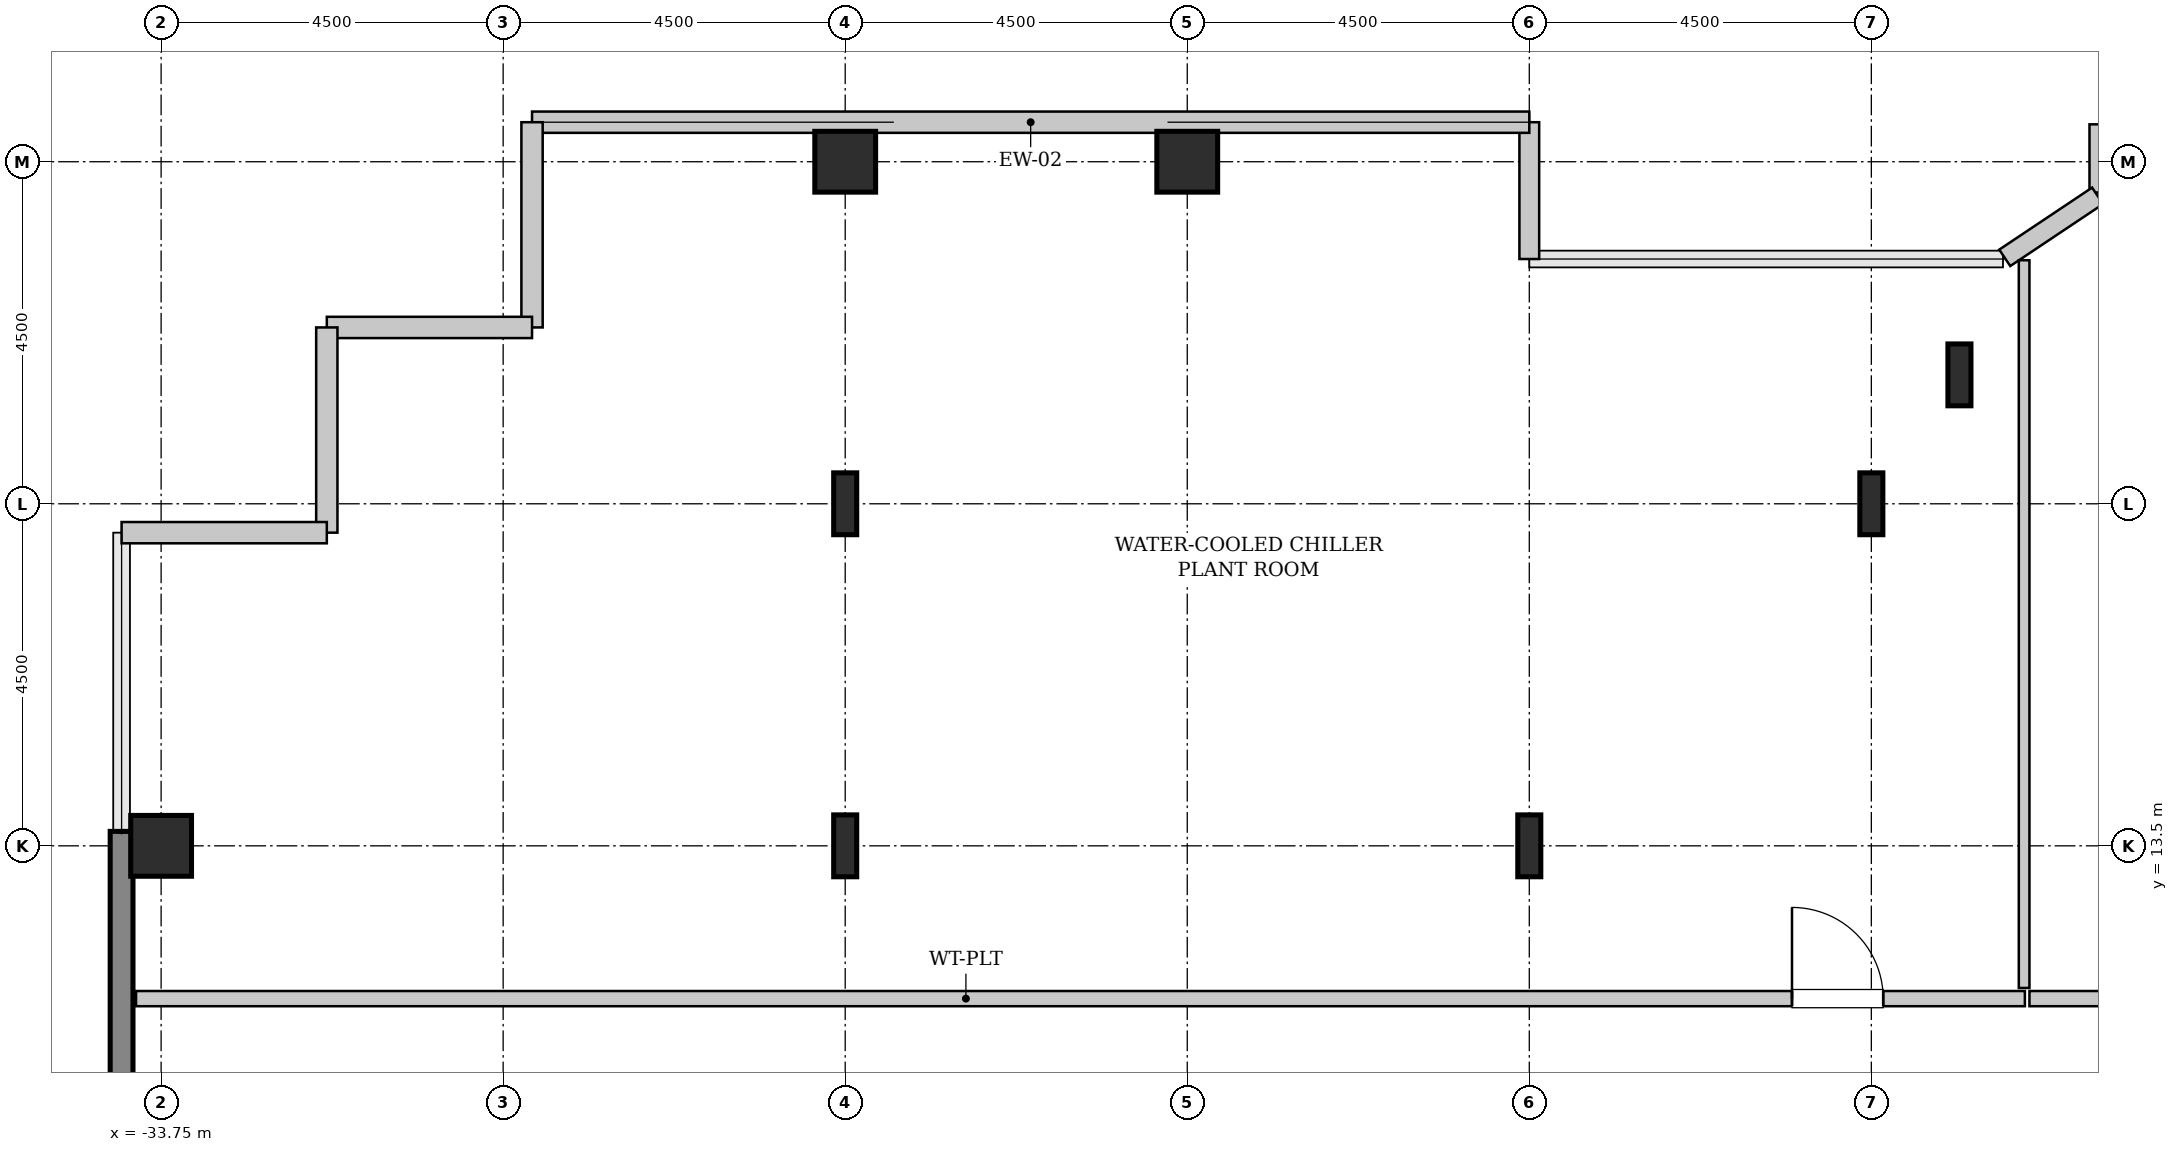
"""IFC4 building model, lengths in metres.
Left out: names, types, materials, properties, quantities, classifications, styles, units other than length and angle.
Written with IfcOpenShell. Run it as: python <this file> out.ifc"""

import sys

from ifc_helpers import new_model, si_unit, direction, frame, frame_2d, origin, origin_2d, place, context, subcontext, project, spatial, rectangle, hollow_rectangle, i_section, extrude, source, transform, mapped, element, fill, save


model = new_model("IFC4")
c1 = context("Model", 3, precision=1e-05, world=origin(), true_north=direction((0.0, 1.0)))
c2 = subcontext(c1, "Body", "Model", "MODEL_VIEW")
j1 = project(units=[si_unit("LENGTHUNIT", "METRE"), si_unit("PLANEANGLEUNIT", "RADIAN")], contexts=[c1])
p1 = place(None, origin())
s1 = spatial("IfcSite", under=j1, at=p1, CompositionType="ELEMENT")
p2 = place(p1, origin())
s2 = spatial("IfcBuilding", under=s1, at=p2, CompositionType="ELEMENT")
p3 = place(p2, frame((0.0, 0.0, 202.0)))
s3 = spatial("IfcBuildingStorey", under=s2, at=p3, CompositionType="ELEMENT", Elevation=202.0)
m1 = source(origin(), c2, "Body", "SweptSolid", [
    extrude(hollow_rectangle(XDim=0.8, YDim=0.8, WallThickness=0.04, InnerFilletRadius=0.04, OuterFilletRadius=0.08, at=origin_2d()), origin(), (0.0, 0.0, 1.0), 4.6),
])
p4 = place(p3, frame((-33.75, 13.5, 0.0), z_axis=(0.0, 0.0, 1.0), x_axis=(1.0, 0.0, 0.0)))
e1 = element("IfcColumn", 1, at=p4, inside=s3, PredefinedType="COLUMN", context=c2, shape_type="MappedRepresentation", body=[
    mapped(m1, transform((0.0, 0.0, 0.0), x_axis=(1.0, 0.0, 0.0), y_axis=(0.0, 1.0, 0.0), z_axis=(0.0, 0.0, 1.0), scale=1.0)),
])
m2 = source(origin(), c2, "Body", "SweptSolid", [
    extrude(i_section(OverallWidth=0.303, OverallDepth=0.814, WebThickness=0.021, FlangeThickness=0.04, FilletRadius=0.03, at=origin_2d()), origin(), (0.0, 0.0, 1.0), 4.6),
])
for number, where, z_axis, x_axis in (
    (2, (-24.75, 13.5, 0.0), (0.0, 0.0, 1.0), (1.0, 0.0, 0.0)),
    (3, (-24.75, 18.0, 0.0), (0.0, 0.0, 1.0), (1.0, 0.0, 0.0)),
):
    element("IfcColumn", number, at=place(p3, frame(where, z_axis=z_axis, x_axis=x_axis)), inside=s3, PredefinedType="COLUMN", context=c2, shape_type="MappedRepresentation", body=[
        mapped(m2, transform((0.0, 0.0, 0.0), x_axis=(1.0, 0.0, 0.0), y_axis=(0.0, 1.0, 0.0), z_axis=(0.0, 0.0, 1.0), scale=1.0)),
    ])
for number, where, z_axis, x_axis in (
    (4, (-24.75, 22.5, 0.0), (0.0, 0.0, 1.0), (1.0, 0.0, 0.0)),
    (5, (-20.25, 22.5, 0.0), (0.0, 0.0, 1.0), (1.0, 0.0, 0.0)),
):
    element("IfcColumn", number, at=place(p3, frame(where, z_axis=z_axis, x_axis=x_axis)), inside=s3, PredefinedType="COLUMN", context=c2, shape_type="MappedRepresentation", body=[
        mapped(m1, transform((0.0, 0.0, 0.0), x_axis=(1.0, 0.0, 0.0), y_axis=(0.0, 1.0, 0.0), z_axis=(0.0, 0.0, 1.0), scale=1.0)),
    ])
for number, where, z_axis, x_axis in (
    (6, (-15.75, 13.5, 0.0), (0.0, 0.0, 1.0), (1.0, 0.0, 0.0)),
    (7, (-11.25, 18.0, 0.0), (0.0, 0.0, 1.0), (1.0, 0.0, 0.0)),
    (8, (-10.091, 19.696, 0.0), (0.0, 0.0, 1.0), (1.0, 0.0, 0.0)),
):
    element("IfcColumn", number, at=place(p3, frame(where, z_axis=z_axis, x_axis=x_axis)), inside=s3, PredefinedType="COLUMN", context=c2, shape_type="MappedRepresentation", body=[
        mapped(m2, transform((0.0, 0.0, 0.0), x_axis=(1.0, 0.0, 0.0), y_axis=(0.0, 1.0, 0.0), z_axis=(0.0, 0.0, 1.0), scale=1.0)),
    ])
m3 = source(origin(), c2, "Body", "SweptSolid", [
    extrude(rectangle(XDim=9.38, YDim=0.3, at=frame_2d((4.69, 0.0))), origin(), (0.0, 0.0, 1.0), 4.35),
])
p5 = place(p3, frame((-34.27, 4.31, 0.0), z_axis=(0.0, 0.0, 1.0), x_axis=(0.0, 1.0, 0.0)))
e9 = element("IfcWall", 9, at=p5, inside=s3, PredefinedType="SHEAR", context=c2, shape_type="MappedRepresentation", body=[
    mapped(m3, transform((0.0, 0.0, 0.0), x_axis=(1.0, 0.0, 0.0), y_axis=(0.0, 1.0, 0.0), z_axis=(0.0, 0.0, 1.0), scale=1.0)),
])
m4 = source(origin(), c2, "Body", "SweptSolid", [
    extrude(rectangle(XDim=0.897, YDim=0.26, at=frame_2d((0.448, 0.0))), origin(), (0.0, 0.0, 1.0), 4.35),
])
p6 = place(p3, frame((-8.25, 22.992, 0.0), z_axis=(0.0, 0.0, 1.0), x_axis=(0.0, -1.0, 0.0)))
e10 = element("IfcWall", 10, at=p6, inside=s3, PredefinedType="SOLIDWALL", context=c2, shape_type="MappedRepresentation", body=[
    mapped(m4, transform((0.0, 0.0, 0.0), x_axis=(1.0, 0.0, 0.0), y_axis=(0.0, 1.0, 0.0), z_axis=(0.0, 0.0, 1.0), scale=1.0)),
])
m5 = source(origin(), c2, "Body", "SweptSolid", [
    extrude(rectangle(XDim=1.469, YDim=0.26, at=frame_2d((0.734, 0.0))), origin(), (0.0, 0.0, 1.0), 4.35),
])
p7 = place(p3, frame((-8.273, 22.052, 0.0), z_axis=(0.0, 0.0, 1.0), x_axis=(-0.831461760506, -0.555581983884, 0.0)))
e11 = element("IfcWall", 11, at=p7, inside=s3, PredefinedType="SOLIDWALL", context=c2, shape_type="MappedRepresentation", body=[
    mapped(m5, transform((0.0, 0.0, 0.0), x_axis=(1.0, 0.0, 0.0), y_axis=(0.0, 1.0, 0.0), z_axis=(0.0, 0.0, 1.0), scale=1.0)),
])
m6 = source(origin(), c2, "Body", "SweptSolid", [
    extrude(rectangle(XDim=1.8, YDim=0.26, at=frame_2d((0.9, 0.0))), origin(), (0.0, 0.0, 1.0), 4.35),
])
p8 = place(p3, frame((-15.75, 21.22, 0.0), z_axis=(0.0, 0.0, 1.0), x_axis=(0.0, 1.0, 0.0)))
e12 = element("IfcWall", 12, at=p8, inside=s3, PredefinedType="SOLIDWALL", context=c2, shape_type="MappedRepresentation", body=[
    mapped(m6, transform((0.0, 0.0, 0.0), x_axis=(1.0, 0.0, 0.0), y_axis=(0.0, 1.0, 0.0), z_axis=(0.0, 0.0, 1.0), scale=1.0)),
])
m7 = source(origin(), c2, "Body", "SweptSolid", [
    extrude(rectangle(XDim=13.12, YDim=0.28, at=frame_2d((6.56, 0.0))), origin(), (0.0, 0.0, 1.0), 1.1),
])
p9 = place(p3, frame((-15.75, 23.02, 0.0), z_axis=(0.0, 0.0, 1.0), x_axis=(-1.0, 0.0, 0.0)))
e13 = element("IfcWall", 13, at=p9, inside=s3, PredefinedType="SOLIDWALL", context=c2, shape_type="MappedRepresentation", body=[
    mapped(m7, transform((0.0, 0.0, 0.0), x_axis=(1.0, 0.0, 0.0), y_axis=(0.0, 1.0, 0.0), z_axis=(0.0, 0.0, 1.0), scale=1.0)),
])
m8 = source(origin(), c2, "Body", "SweptSolid", [
    extrude(rectangle(XDim=2.7, YDim=0.28, at=frame_2d((1.35, 0.0))), origin(), (0.0, 0.0, 1.0), 4.35),
])
for number, where, z_axis, x_axis in (
    (14, (-28.87, 23.02, 0.0), (0.0, 0.0, 1.0), (0.0, -1.0, 0.0)),
    (15, (-28.87, 20.32, 0.0), (0.0, 0.0, 1.0), (-1.0, 0.0, 0.0)),
    (16, (-31.57, 20.32, 0.0), (0.0, 0.0, 1.0), (0.0, -1.0, 0.0)),
    (17, (-31.57, 17.62, 0.0), (0.0, 0.0, 1.0), (-1.0, 0.0, 0.0)),
):
    element("IfcWall", number, at=place(p3, frame(where, z_axis=z_axis, x_axis=x_axis)), inside=s3, PredefinedType="SOLIDWALL", context=c2, shape_type="MappedRepresentation", body=[
        mapped(m8, transform((0.0, 0.0, 0.0), x_axis=(1.0, 0.0, 0.0), y_axis=(0.0, 1.0, 0.0), z_axis=(0.0, 0.0, 1.0), scale=1.0)),
    ])
m9 = source(origin(), c2, "Body", "SweptSolid", [
    extrude(rectangle(XDim=24.85, YDim=0.2, at=frame_2d((12.425, 0.0))), origin(), (0.0, 0.0, 1.0), 4.335),
])
p10 = place(p3, frame((-34.08, 11.49, 0.0), z_axis=(0.0, 0.0, 1.0), x_axis=(1.0, 0.0, 0.0)))
e18 = element("IfcWall", 18, at=p10, inside=s3, PredefinedType="SOLIDWALL", context=c2, shape_type="MappedRepresentation", body=[
    mapped(m9, transform((0.0, 0.0, 0.0), x_axis=(1.0, 0.0, 0.0), y_axis=(0.0, 1.0, 0.0), z_axis=(0.0, 0.0, 1.0), scale=1.0)),
])
p11 = place(p10, frame((21.786, 0.0, 0.0)))
e19 = element("IfcOpeningElement", 19, at=p11, cuts=e18, PredefinedType="OPENING", context=c2, shape_type="SweptSolid", body=[
    extrude(rectangle(XDim=1.2, YDim=2.15, at=frame_2d((0.6, 1.075))), frame((0.0, 0.11, 0.0), z_axis=(0.0, -1.0, 0.0), x_axis=(1.0, 0.0, 0.0)), (0.0, 0.0, 1.0), 0.22),
])
m10 = source(origin(), c2, "Body", "SweptSolid", [
    extrude(rectangle(XDim=9.574, YDim=0.14, at=frame_2d((4.787, 0.0))), origin(), (0.0, 0.0, 1.0), 4.335),
])
p12 = place(p3, frame((-9.24, 11.63, 0.0), z_axis=(0.0, 0.0, 1.0), x_axis=(0.0, 1.0, 0.0)))
e20 = element("IfcWall", 20, at=p12, inside=s3, PredefinedType="PARTITIONING", context=c2, shape_type="MappedRepresentation", body=[
    mapped(m10, transform((0.0, 0.0, 0.0), x_axis=(1.0, 0.0, 0.0), y_axis=(0.0, 1.0, 0.0), z_axis=(0.0, 0.0, 1.0), scale=1.0)),
])
m11 = source(origin(), c2, "Body", "SweptSolid", [
    extrude(rectangle(XDim=4.54, YDim=0.2, at=frame_2d((2.27, 0.0))), origin(), (0.0, 0.0, 1.0), 4.335),
])
p13 = place(p3, frame((-9.17, 11.49, 0.0), z_axis=(0.0, 0.0, 1.0), x_axis=(1.0, 0.0, 0.0)))
e21 = element("IfcWall", 21, at=p13, inside=s3, PredefinedType="SOLIDWALL", context=c2, shape_type="MappedRepresentation", body=[
    mapped(m11, transform((0.0, 0.0, 0.0), x_axis=(1.0, 0.0, 0.0), y_axis=(0.0, 1.0, 0.0), z_axis=(0.0, 0.0, 1.0), scale=1.0)),
])
p14 = place(p13, frame((1.67, 0.0, 0.0)))
e22 = element("IfcOpeningElement", 22, at=p14, cuts=e21, PredefinedType="OPENING", context=c2, shape_type="SweptSolid", body=[
    extrude(rectangle(XDim=1.2, YDim=2.15, at=frame_2d((0.6, 1.075))), frame((0.0, 0.11, 0.0), z_axis=(0.0, -1.0, 0.0), x_axis=(1.0, 0.0, 0.0)), (0.0, 0.0, 1.0), 0.22),
])
m12 = source(origin(), c2, "Body", "SweptSolid", [
    extrude(rectangle(XDim=1.2, YDim=2.15, at=frame_2d((0.6, 1.075))), frame((0.0, 0.025, 0.0), z_axis=(0.0, -1.0, 0.0), x_axis=(1.0, 0.0, 0.0)), (0.0, 0.0, 1.0), 0.05),
])
p15 = place(p11, origin())
e23 = element("IfcDoor", 23, at=p15, inside=s3, OperationType="SINGLE_SWING_LEFT", PredefinedType="DOOR", context=c2, shape_type="MappedRepresentation", body=[
    mapped(m12, transform((0.0, 0.0, 0.0), x_axis=(1.0, 0.0, 0.0), y_axis=(0.0, 1.0, 0.0), z_axis=(0.0, 0.0, 1.0), scale=1.0)),
])
fill(e19, e23)
save(model, sys.argv[1])
